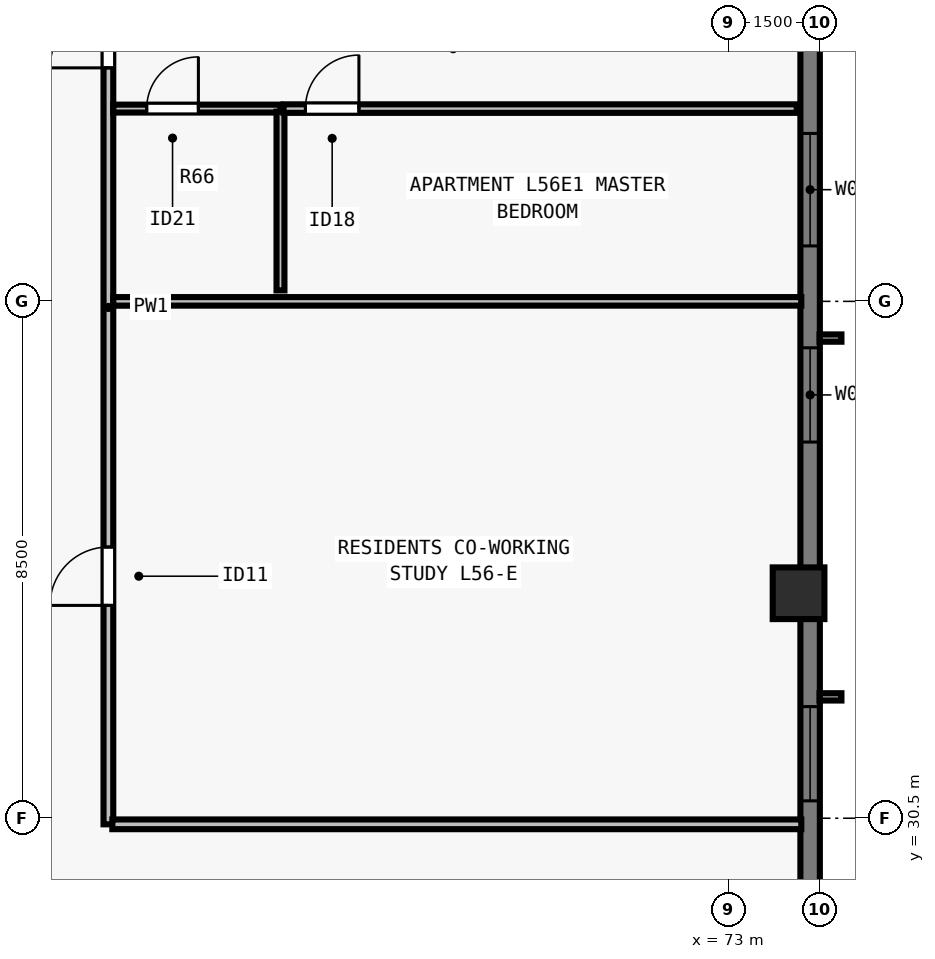
"""IFC4 building model, lengths in metres.
Left out: names, types, materials, properties, quantities, classifications, styles, units other than length and angle.
Written with IfcOpenShell. Run it as: python <this file> out.ifc"""

import sys

from ifc_helpers import new_model, si_unit, direction, frame, frame_2d, origin, origin_2d, place, context, subcontext, project, spatial, rectangle, extrude, element, fill, save


model = new_model("IFC4")
c1 = context("Model", 3, precision=1e-05, world=origin(), true_north=direction((0.0, 1.0)))
c2 = subcontext(c1, "Body", "Model", "MODEL_VIEW")
j1 = project(units=[si_unit("LENGTHUNIT", "METRE"), si_unit("PLANEANGLEUNIT", "RADIAN")], contexts=[c1])
p1 = place(None, origin())
s1 = spatial("IfcSite", under=j1, at=p1, CompositionType="ELEMENT")
p2 = place(p1, origin())
s2 = spatial("IfcBuilding", under=s1, at=p2, CompositionType="ELEMENT")
p3 = place(p2, frame((0.0, 0.0, 206.0)))
s3 = spatial("IfcBuildingStorey", under=s2, at=p3, CompositionType="ELEMENT", Elevation=206.0)
p4 = place(p3, frame((74.15, 34.2, 0.0), z_axis=(0.0, 0.0, 1.0), x_axis=(0.0, 1.0, 0.0)))
e1 = element("IfcColumn", 1, at=p4, inside=s3, PredefinedType="COLUMN", context=c2, shape_type="SweptSolid", body=[
    extrude(rectangle(XDim=0.85, YDim=0.85, at=origin_2d()), origin(), (0.0, 0.0, 1.0), 3.5),
])
p5 = place(p3, frame((74.34, 56.5, 0.0), z_axis=(0.0, 0.0, 1.0), x_axis=(0.0, -1.0, 0.0)))
e2 = element("IfcWall", 2, at=p5, inside=s3, PredefinedType="SOLIDWALL", context=c2, shape_type="SweptSolid", body=[
    extrude(rectangle(XDim=34.702, YDim=0.32, at=frame_2d((17.351, 0.0))), origin(), (0.0, 0.0, 1.0), 3.29),
])
p6 = place(p5, frame((4.312, 0.0, 0.8)))
e3 = element("IfcOpeningElement", 3, at=p6, cuts=e2, PredefinedType="OPENING", context=c2, shape_type="SweptSolid", body=[
    extrude(rectangle(XDim=1.55, YDim=1.678, at=frame_2d((0.775, 0.839))), frame((0.0, 0.17, 0.0), z_axis=(0.0, -1.0, 0.0), x_axis=(1.0, 0.0, 0.0)), (0.0, 0.0, 1.0), 0.34),
])
p7 = place(p5, frame((9.238, 0.0, 0.8)))
e4 = element("IfcOpeningElement", 4, at=p7, cuts=e2, PredefinedType="OPENING", context=c2, shape_type="SweptSolid", body=[
    extrude(rectangle(XDim=1.85, YDim=1.678, at=frame_2d((0.925, 0.839))), frame((0.0, 0.17, 0.0), z_axis=(0.0, -1.0, 0.0), x_axis=(1.0, 0.0, 0.0)), (0.0, 0.0, 1.0), 0.34),
])
p8 = place(p5, frame((14.738, 0.0, 0.8)))
e5 = element("IfcOpeningElement", 5, at=p8, cuts=e2, PredefinedType="OPENING", context=c2, shape_type="SweptSolid", body=[
    extrude(rectangle(XDim=1.85, YDim=1.678, at=frame_2d((0.925, 0.839))), frame((0.0, 0.17, 0.0), z_axis=(0.0, -1.0, 0.0), x_axis=(1.0, 0.0, 0.0)), (0.0, 0.0, 1.0), 0.34),
])
p9 = place(p5, frame((18.264, 0.0, 0.8)))
e6 = element("IfcOpeningElement", 6, at=p9, cuts=e2, PredefinedType="OPENING", context=c2, shape_type="SweptSolid", body=[
    extrude(rectangle(XDim=1.55, YDim=1.678, at=frame_2d((0.775, 0.839))), frame((0.0, 0.17, 0.0), z_axis=(0.0, -1.0, 0.0), x_axis=(1.0, 0.0, 0.0)), (0.0, 0.0, 1.0), 0.34),
])
p10 = place(p5, frame((24.164, 0.0, 0.8)))
e7 = element("IfcOpeningElement", 7, at=p10, cuts=e2, PredefinedType="OPENING", context=c2, shape_type="SweptSolid", body=[
    extrude(rectangle(XDim=1.55, YDim=1.678, at=frame_2d((0.775, 0.839))), frame((0.0, 0.17, 0.0), z_axis=(0.0, -1.0, 0.0), x_axis=(1.0, 0.0, 0.0)), (0.0, 0.0, 1.0), 0.34),
])
p11 = place(p3, frame((62.8, 30.4, 0.0), z_axis=(0.0, 0.0, 1.0), x_axis=(0.0, 1.0, 0.0)))
e8 = element("IfcWall", 8, at=p11, inside=s3, PredefinedType="PARTITIONING", context=c2, shape_type="SweptSolid", body=[
    extrude(rectangle(XDim=17.2, YDim=0.16, at=frame_2d((8.6, 0.0))), origin(), (0.0, 0.0, 1.0), 3.29),
])
p12 = place(p11, frame((3.6, 0.0, 0.0)))
e9 = element("IfcOpeningElement", 9, at=p12, cuts=e8, PredefinedType="OPENING", context=c2, shape_type="SweptSolid", body=[
    extrude(rectangle(XDim=0.96, YDim=2.12, at=frame_2d((0.48, 1.06))), frame((0.0, 0.09, 0.0), z_axis=(0.0, -1.0, 0.0), x_axis=(1.0, 0.0, 0.0)), (0.0, 0.0, 1.0), 0.18),
])
p13 = place(p11, frame((12.44, 0.0, 0.0)))
e10 = element("IfcOpeningElement", 10, at=p13, cuts=e8, PredefinedType="OPENING", context=c2, shape_type="SweptSolid", body=[
    extrude(rectangle(XDim=0.96, YDim=2.18, at=frame_2d((0.48, 1.09))), frame((0.0, 0.09, 0.0), z_axis=(0.0, -1.0, 0.0), x_axis=(1.0, 0.0, 0.0)), (0.0, 0.0, 1.0), 0.18),
])
p14 = place(p3, frame((62.865, 30.4, 0.0), z_axis=(0.0, 0.0, 1.0), x_axis=(1.0, 0.0, 0.0)))
e11 = element("IfcWall", 11, at=p14, inside=s3, PredefinedType="PARTITIONING", context=c2, shape_type="SweptSolid", body=[
    extrude(rectangle(XDim=11.33, YDim=0.16, at=frame_2d((5.665, 0.0))), origin(), (0.0, 0.0, 1.0), 3.29),
])
p15 = place(p3, frame((62.88, 39.0, 0.0), z_axis=(0.0, 0.0, 1.0), x_axis=(1.0, 0.0, 0.0)))
e12 = element("IfcWall", 12, at=p15, inside=s3, PredefinedType="PARTITIONING", context=c2, shape_type="SweptSolid", body=[
    extrude(rectangle(XDim=11.315, YDim=0.14, at=frame_2d((5.658, 0.0))), origin(), (0.0, 0.0, 1.0), 3.29),
])
p16 = place(p3, frame((62.88, 42.17, 0.0), z_axis=(0.0, 0.0, 1.0), x_axis=(1.0, 0.0, 0.0)))
e13 = element("IfcWall", 13, at=p16, inside=s3, PredefinedType="PLUMBINGWALL", context=c2, shape_type="SweptSolid", body=[
    extrude(rectangle(XDim=2.75, YDim=0.13, at=frame_2d((1.375, 0.0))), origin(), (0.0, 0.0, 1.0), 3.29),
])
p17 = place(p16, frame((0.55, 0.0, 0.0)))
e14 = element("IfcOpeningElement", 14, at=p17, cuts=e13, PredefinedType="OPENING", context=c2, shape_type="SweptSolid", body=[
    extrude(rectangle(XDim=0.85, YDim=2.08, at=frame_2d((0.425, 1.04))), frame((0.0, 0.075, 0.0), z_axis=(0.0, -1.0, 0.0), x_axis=(1.0, 0.0, 0.0)), (0.0, 0.0, 1.0), 0.15),
])
p18 = place(p3, frame((65.63, 39.18, 0.0), z_axis=(0.0, 0.0, 1.0), x_axis=(0.0, 1.0, 0.0)))
e15 = element("IfcWall", 15, at=p18, inside=s3, PredefinedType="PLUMBINGWALL", context=c2, shape_type="SweptSolid", body=[
    extrude(rectangle(XDim=2.94, YDim=0.13, at=frame_2d((1.47, 0.0))), origin(), (0.0, 0.0, 1.0), 3.29),
])
p19 = place(p3, frame((65.68, 42.17, 0.0), z_axis=(0.0, 0.0, 1.0), x_axis=(1.0, 0.0, 0.0)))
e16 = element("IfcWall", 16, at=p19, inside=s3, PredefinedType="PARTITIONING", context=c2, shape_type="SweptSolid", body=[
    extrude(rectangle(XDim=8.44, YDim=0.14, at=frame_2d((4.22, 0.0))), origin(), (0.0, 0.0, 1.0), 3.29),
])
p20 = place(p19, frame((0.36, 0.0, 0.0)))
e17 = element("IfcOpeningElement", 17, at=p20, cuts=e16, PredefinedType="OPENING", context=c2, shape_type="SweptSolid", body=[
    extrude(rectangle(XDim=0.88, YDim=2.1, at=frame_2d((0.44, 1.05))), frame((0.0, 0.08, 0.0), z_axis=(0.0, -1.0, 0.0), x_axis=(1.0, 0.0, 0.0)), (0.0, 0.0, 1.0), 0.16),
])
p21 = place(p8, origin())
e18 = element("IfcWindow", 18, at=p21, inside=s3, PartitioningType="SINGLE_PANEL", PredefinedType="WINDOW", context=c2, shape_type="SweptSolid", body=[
    extrude(rectangle(XDim=1.85, YDim=1.678, at=frame_2d((0.925, 0.839))), frame((0.0, -0.05, 0.0), z_axis=(0.0, -1.0, 0.0), x_axis=(1.0, 0.0, 0.0)), (0.0, 0.0, 1.0), 0.06),
])
fill(e5, e18)
p22 = place(p9, origin())
e19 = element("IfcWindow", 19, at=p22, inside=s3, PartitioningType="SINGLE_PANEL", PredefinedType="WINDOW", context=c2, shape_type="SweptSolid", body=[
    extrude(rectangle(XDim=1.55, YDim=1.678, at=frame_2d((0.775, 0.839))), frame((0.0, -0.05, 0.0), z_axis=(0.0, -1.0, 0.0), x_axis=(1.0, 0.0, 0.0)), (0.0, 0.0, 1.0), 0.06),
])
fill(e6, e19)
p23 = place(p10, origin())
e20 = element("IfcWindow", 20, at=p23, inside=s3, PartitioningType="SINGLE_PANEL", PredefinedType="WINDOW", context=c2, shape_type="SweptSolid", body=[
    extrude(rectangle(XDim=1.55, YDim=1.678, at=frame_2d((0.775, 0.839))), frame((0.0, -0.05, 0.0), z_axis=(0.0, -1.0, 0.0), x_axis=(1.0, 0.0, 0.0)), (0.0, 0.0, 1.0), 0.06),
])
fill(e7, e20)
p24 = place(p12, origin())
e21 = element("IfcDoor", 21, at=p24, inside=s3, OperationType="SINGLE_SWING_LEFT", PredefinedType="DOOR", context=c2, shape_type="SweptSolid", body=[
    extrude(rectangle(XDim=0.96, YDim=2.12, at=frame_2d((0.48, 1.06))), frame((0.0, 0.025, 0.0), z_axis=(0.0, -1.0, 0.0), x_axis=(1.0, 0.0, 0.0)), (0.0, 0.0, 1.0), 0.05),
])
fill(e9, e21)
p25 = place(p17, origin())
e22 = element("IfcDoor", 22, at=p25, inside=s3, OperationType="SINGLE_SWING_RIGHT", PredefinedType="DOOR", context=c2, shape_type="SweptSolid", body=[
    extrude(rectangle(XDim=0.85, YDim=2.08, at=frame_2d((0.425, 1.04))), frame((0.0, 0.025, 0.0), z_axis=(0.0, -1.0, 0.0), x_axis=(1.0, 0.0, 0.0)), (0.0, 0.0, 1.0), 0.05),
])
fill(e14, e22)
p26 = place(p20, origin())
e23 = element("IfcDoor", 23, at=p26, inside=s3, OperationType="SINGLE_SWING_RIGHT", PredefinedType="DOOR", context=c2, shape_type="SweptSolid", body=[
    extrude(rectangle(XDim=0.88, YDim=2.1, at=frame_2d((0.44, 1.05))), frame((0.0, 0.025, 0.0), z_axis=(0.0, -1.0, 0.0), x_axis=(1.0, 0.0, 0.0)), (0.0, 0.0, 1.0), 0.05),
])
fill(e17, e23)
p27 = place(p13, origin())
e24 = element("IfcDoor", 24, at=p27, inside=s3, OperationType="SINGLE_SWING_LEFT", PredefinedType="DOOR", context=c2, shape_type="SweptSolid", body=[
    extrude(rectangle(XDim=0.96, YDim=2.18, at=frame_2d((0.48, 1.09))), frame((0.0, 0.025, 0.0), z_axis=(0.0, -1.0, 0.0), x_axis=(1.0, 0.0, 0.0)), (0.0, 0.0, 1.0), 0.05),
])
fill(e10, e24)
save(model, sys.argv[1])
